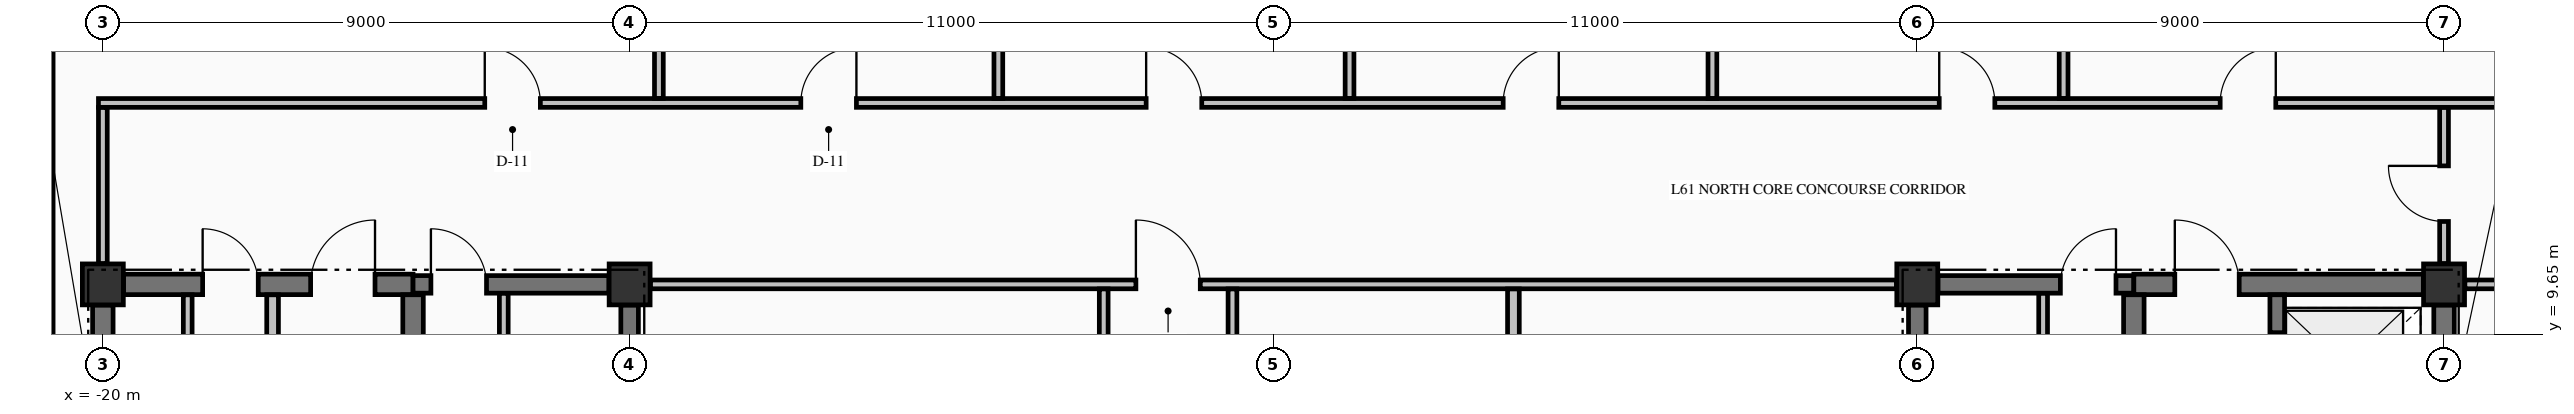
"""IFC4 building model, lengths in metres.
Left out: names, types, materials, properties, quantities, classifications, styles, units other than length and angle.
Written with IfcOpenShell. Run it as: python <this file> out.ifc"""

import sys

from ifc_helpers import new_model, si_unit, direction, frame, frame_2d, origin, origin_2d, place, context, subcontext, project, spatial, rectangle, extrude, element, fill, save


model = new_model("IFC4")
c1 = context("Model", 3, precision=1e-05, world=origin(), true_north=direction((0.0, 1.0)))
c2 = subcontext(c1, "Body", "Model", "MODEL_VIEW")
j1 = project(units=[si_unit("LENGTHUNIT", "METRE"), si_unit("PLANEANGLEUNIT", "RADIAN")], contexts=[c1])
p1 = place(None, origin())
s1 = spatial("IfcSite", under=j1, at=p1, CompositionType="ELEMENT")
p2 = place(p1, origin())
s2 = spatial("IfcBuilding", under=s1, at=p2, CompositionType="ELEMENT")
p3 = place(p2, frame((0.0, 0.0, 233.28)))
s3 = spatial("IfcBuildingStorey", under=s2, at=p3, CompositionType="ELEMENT", Elevation=233.28)
for number, where, z_axis, x_axis in (
    (1, (-20.0, 10.5, -0.25), (0.0, 0.0, 1.0), (1.0, 0.0, 0.0)),
    (2, (-11.0, 10.5, -0.25), (0.0, 0.0, 1.0), (1.0, 0.0, 0.0)),
    (3, (11.0, 10.5, -0.25), (0.0, 0.0, 1.0), (1.0, 0.0, 0.0)),
    (4, (20.0, 10.5, -0.25), (0.0, 0.0, 1.0), (1.0, 0.0, 0.0)),
):
    element("IfcColumn", number, at=place(p3, frame(where, z_axis=z_axis, x_axis=x_axis)), inside=s3, PredefinedType="COLUMN", context=c2, shape_type="SweptSolid", body=[
        extrude(rectangle(XDim=0.7, YDim=0.7, at=origin_2d()), origin(), (0.0, 0.0, 1.0), 3.23),
    ])
p4 = place(p3, frame((-21.0, 17.545, 0.0), z_axis=(0.0, 0.0, 1.0), x_axis=(0.0, -1.0, 0.0)))
e5 = element("IfcWall", 5, at=p4, inside=s3, PredefinedType="STANDARD", context=c2, shape_type="SweptSolid", body=[
    extrude(rectangle(XDim=8.09, YDim=0.3, at=frame_2d((4.045, 0.0))), origin(), (0.0, 0.0, 1.0), 2.372),
])
p5 = place(p3, frame((-19.646, 10.5, 0.0), z_axis=(0.0, 0.0, 1.0), x_axis=(1.0, 0.0, 0.0)))
e6 = element("IfcWall", 6, at=p5, inside=s3, PredefinedType="SHEAR", context=c2, shape_type="SweptSolid", body=[
    extrude(rectangle(XDim=4.946, YDim=0.35, at=frame_2d((2.473, 0.0))), origin(), (0.0, 0.0, 1.0), 2.98),
])
p6 = place(p5, frame((3.196, 0.0, 0.0)))
e7 = element("IfcOpeningElement", 7, at=p6, cuts=e6, PredefinedType="OPENING", context=c2, shape_type="SweptSolid", body=[
    extrude(rectangle(XDim=1.1, YDim=2.15, at=frame_2d((0.55, 1.075))), frame((0.0, 0.185, 0.0), z_axis=(0.0, -1.0, 0.0), x_axis=(1.0, 0.0, 0.0)), (0.0, 0.0, 1.0), 0.37),
])
p7 = place(p5, frame((1.351, 0.0, 0.0)))
e8 = element("IfcOpeningElement", 8, at=p7, cuts=e6, PredefinedType="OPENING", context=c2, shape_type="SweptSolid", body=[
    extrude(rectangle(XDim=0.95, YDim=2.15, at=frame_2d((0.475, 1.075))), frame((0.0, 0.185, 0.0), z_axis=(0.0, -1.0, 0.0), x_axis=(1.0, 0.0, 0.0)), (0.0, 0.0, 1.0), 0.37),
])
p8 = place(p3, frame((-14.7, 10.5, 0.0), z_axis=(0.0, 0.0, 1.0), x_axis=(1.0, 0.0, 0.0)))
e9 = element("IfcWall", 9, at=p8, inside=s3, PredefinedType="SHEAR", context=c2, shape_type="SweptSolid", body=[
    extrude(rectangle(XDim=3.346, YDim=0.3, at=frame_2d((1.673, 0.0))), origin(), (0.0, 0.0, 1.0), 2.98),
])
p9 = place(p8, frame((0.305, 0.0, 0.0)))
e10 = element("IfcOpeningElement", 10, at=p9, cuts=e9, PredefinedType="OPENING", context=c2, shape_type="SweptSolid", body=[
    extrude(rectangle(XDim=0.95, YDim=2.15, at=frame_2d((0.475, 1.075))), frame((0.0, 0.16, 0.0), z_axis=(0.0, -1.0, 0.0), x_axis=(1.0, 0.0, 0.0)), (0.0, 0.0, 1.0), 0.32),
])
p10 = place(p3, frame((11.354, 10.5, 0.0), z_axis=(0.0, 0.0, 1.0), x_axis=(1.0, 0.0, 0.0)))
e11 = element("IfcWall", 11, at=p10, inside=s3, PredefinedType="SHEAR", context=c2, shape_type="SweptSolid", body=[
    extrude(rectangle(XDim=3.346, YDim=0.3, at=frame_2d((1.673, 0.0))), origin(), (0.0, 0.0, 1.0), 2.98),
])
p11 = place(p10, frame((2.091, 0.0, 0.0)))
e12 = element("IfcOpeningElement", 12, at=p11, cuts=e11, PredefinedType="OPENING", context=c2, shape_type="SweptSolid", body=[
    extrude(rectangle(XDim=0.95, YDim=2.15, at=frame_2d((0.475, 1.075))), frame((0.0, 0.16, 0.0), z_axis=(0.0, -1.0, 0.0), x_axis=(1.0, 0.0, 0.0)), (0.0, 0.0, 1.0), 0.32),
])
p12 = place(p3, frame((14.7, 10.5, 0.0), z_axis=(0.0, 0.0, 1.0), x_axis=(1.0, 0.0, 0.0)))
e13 = element("IfcWall", 13, at=p12, inside=s3, PredefinedType="SHEAR", context=c2, shape_type="SweptSolid", body=[
    extrude(rectangle(XDim=4.946, YDim=0.35, at=frame_2d((2.473, 0.0))), origin(), (0.0, 0.0, 1.0), 2.98),
])
p13 = place(p12, frame((0.7, 0.0, 0.0)))
e14 = element("IfcOpeningElement", 14, at=p13, cuts=e13, PredefinedType="OPENING", context=c2, shape_type="SweptSolid", body=[
    extrude(rectangle(XDim=1.1, YDim=2.15, at=frame_2d((0.55, 1.075))), frame((0.0, 0.185, 0.0), z_axis=(0.0, -1.0, 0.0), x_axis=(1.0, 0.0, 0.0)), (0.0, 0.0, 1.0), 0.37),
])
p14 = place(p3, frame((-10.644, 10.5, 0.0), z_axis=(0.0, 0.0, 1.0), x_axis=(1.0, 0.0, 0.0)))
e15 = element("IfcWall", 15, at=p14, inside=s3, PredefinedType="PARTITIONING", context=c2, shape_type="SweptSolid", body=[
    extrude(rectangle(XDim=21.288, YDim=0.15, at=frame_2d((10.644, 0.0))), origin(), (0.0, 0.0, 1.0), 2.98),
])
p15 = place(p14, frame((8.294, 0.0, 0.0)))
e16 = element("IfcOpeningElement", 16, at=p15, cuts=e15, PredefinedType="OPENING", context=c2, shape_type="SweptSolid", body=[
    extrude(rectangle(XDim=1.1, YDim=2.15, at=frame_2d((0.55, 1.075))), frame((0.0, 0.085, 0.0), z_axis=(0.0, -1.0, 0.0), x_axis=(1.0, 0.0, 0.0)), (0.0, 0.0, 1.0), 0.17),
])
p16 = place(p3, frame((20.356, 10.5, 0.0), z_axis=(0.0, 0.0, 1.0), x_axis=(1.0, 0.0, 0.0)))
e17 = element("IfcWall", 17, at=p16, inside=s3, PredefinedType="PARTITIONING", context=c2, shape_type="SweptSolid", body=[
    extrude(rectangle(XDim=5.479, YDim=0.15, at=frame_2d((2.74, 0.0))), origin(), (0.0, 0.0, 1.0), 2.98),
])
p17 = place(p16, frame((2.169, 0.0, 0.0)))
e18 = element("IfcOpeningElement", 18, at=p17, cuts=e17, PredefinedType="OPENING", context=c2, shape_type="SweptSolid", body=[
    extrude(rectangle(XDim=0.95, YDim=2.15, at=frame_2d((0.475, 1.075))), frame((0.0, 0.085, 0.0), z_axis=(0.0, -1.0, 0.0), x_axis=(1.0, 0.0, 0.0)), (0.0, 0.0, 1.0), 0.17),
])
p18 = place(p3, frame((-20.075, 13.6, 0.0), z_axis=(0.0, 0.0, 1.0), x_axis=(1.0, 0.0, 0.0)))
e19 = element("IfcWall", 19, at=p18, inside=s3, PredefinedType="PARTITIONING", context=c2, shape_type="SweptSolid", body=[
    extrude(rectangle(XDim=45.91, YDim=0.15, at=frame_2d((22.955, 0.0))), origin(), (0.0, 0.0, 1.0), 2.98),
])
p19 = place(p18, frame((6.6, 0.0, 0.0)))
e20 = element("IfcOpeningElement", 20, at=p19, cuts=e19, PredefinedType="OPENING", context=c2, shape_type="SweptSolid", body=[
    extrude(rectangle(XDim=0.95, YDim=2.15, at=frame_2d((0.475, 1.075))), frame((0.0, 0.085, 0.0), z_axis=(0.0, -1.0, 0.0), x_axis=(1.0, 0.0, 0.0)), (0.0, 0.0, 1.0), 0.17),
])
p20 = place(p18, frame((12.0, 0.0, 0.0)))
e21 = element("IfcOpeningElement", 21, at=p20, cuts=e19, PredefinedType="OPENING", context=c2, shape_type="SweptSolid", body=[
    extrude(rectangle(XDim=0.95, YDim=2.15, at=frame_2d((0.475, 1.075))), frame((0.0, 0.085, 0.0), z_axis=(0.0, -1.0, 0.0), x_axis=(1.0, 0.0, 0.0)), (0.0, 0.0, 1.0), 0.17),
])
p21 = place(p18, frame((17.9, 0.0, 0.0)))
e22 = element("IfcOpeningElement", 22, at=p21, cuts=e19, PredefinedType="OPENING", context=c2, shape_type="SweptSolid", body=[
    extrude(rectangle(XDim=0.95, YDim=2.15, at=frame_2d((0.475, 1.075))), frame((0.0, 0.085, 0.0), z_axis=(0.0, -1.0, 0.0), x_axis=(1.0, 0.0, 0.0)), (0.0, 0.0, 1.0), 0.17),
])
p22 = place(p18, frame((24.0, 0.0, 0.0)))
e23 = element("IfcOpeningElement", 23, at=p22, cuts=e19, PredefinedType="OPENING", context=c2, shape_type="SweptSolid", body=[
    extrude(rectangle(XDim=0.95, YDim=2.15, at=frame_2d((0.475, 1.075))), frame((0.0, 0.085, 0.0), z_axis=(0.0, -1.0, 0.0), x_axis=(1.0, 0.0, 0.0)), (0.0, 0.0, 1.0), 0.17),
])
p23 = place(p18, frame((31.45, 0.0, 0.0)))
e24 = element("IfcOpeningElement", 24, at=p23, cuts=e19, PredefinedType="OPENING", context=c2, shape_type="SweptSolid", body=[
    extrude(rectangle(XDim=0.95, YDim=2.15, at=frame_2d((0.475, 1.075))), frame((0.0, 0.085, 0.0), z_axis=(0.0, -1.0, 0.0), x_axis=(1.0, 0.0, 0.0)), (0.0, 0.0, 1.0), 0.17),
])
p24 = place(p18, frame((36.25, 0.0, 0.0)))
e25 = element("IfcOpeningElement", 25, at=p24, cuts=e19, PredefinedType="OPENING", context=c2, shape_type="SweptSolid", body=[
    extrude(rectangle(XDim=0.95, YDim=2.15, at=frame_2d((0.475, 1.075))), frame((0.0, 0.085, 0.0), z_axis=(0.0, -1.0, 0.0), x_axis=(1.0, 0.0, 0.0)), (0.0, 0.0, 1.0), 0.17),
])
p25 = place(p3, frame((-20.0, 5.327, 0.0), z_axis=(0.0, 0.0, 1.0), x_axis=(0.0, 1.0, 0.0)))
e26 = element("IfcWall", 26, at=p25, inside=s3, PredefinedType="SHEAR", context=c2, shape_type="SweptSolid", body=[
    extrude(rectangle(XDim=4.819, YDim=0.35, at=frame_2d((2.41, 0.0))), origin(), (0.0, 0.0, 1.0), 2.98),
])
p26 = place(p3, frame((-14.7, 5.852, 0.0), z_axis=(0.0, 0.0, 1.0), x_axis=(0.0, 1.0, 0.0)))
e27 = element("IfcWall", 27, at=p26, inside=s3, PredefinedType="SHEAR", context=c2, shape_type="SweptSolid", body=[
    extrude(rectangle(XDim=4.471, YDim=0.35, at=frame_2d((2.235, 0.0))), origin(), (0.0, 0.0, 1.0), 2.98),
])
for number, where, z_axis, x_axis in (
    (28, (-11.0, 5.852, 0.0), (0.0, 0.0, 1.0), (0.0, 1.0, 0.0)),
    (29, (11.0, 5.852, 0.0), (0.0, 0.0, 1.0), (0.0, 1.0, 0.0)),
):
    element("IfcWall", number, at=place(p3, frame(where, z_axis=z_axis, x_axis=x_axis)), inside=s3, PredefinedType="SHEAR", context=c2, shape_type="SweptSolid", body=[
        extrude(rectangle(XDim=4.294, YDim=0.3, at=frame_2d((2.147, 0.0))), origin(), (0.0, 0.0, 1.0), 2.98),
    ])
p27 = place(p3, frame((14.7, 5.852, 0.0), z_axis=(0.0, 0.0, 1.0), x_axis=(0.0, 1.0, 0.0)))
e30 = element("IfcWall", 30, at=p27, inside=s3, PredefinedType="SHEAR", context=c2, shape_type="SweptSolid", body=[
    extrude(rectangle(XDim=4.471, YDim=0.35, at=frame_2d((2.235, 0.0))), origin(), (0.0, 0.0, 1.0), 2.98),
])
p28 = place(p3, frame((17.15, 7.877, 0.0), z_axis=(0.0, 0.0, 1.0), x_axis=(0.0, 1.0, 0.0)))
e31 = element("IfcWall", 31, at=p28, inside=s3, PredefinedType="SOLIDWALL", context=c2, shape_type="SweptSolid", body=[
    extrude(rectangle(XDim=2.446, YDim=0.25, at=frame_2d((1.223, 0.0))), origin(), (0.0, 0.0, 1.0), 2.98),
])
p29 = place(p28, frame((0.698, 0.0, 0.0)))
e32 = element("IfcOpeningElement", 32, at=p29, cuts=e31, PredefinedType="OPENING", context=c2, shape_type="SweptSolid", body=[
    extrude(rectangle(XDim=1.1, YDim=2.2, at=frame_2d((0.55, 1.1))), frame((0.0, 0.135, 0.0), z_axis=(0.0, -1.0, 0.0), x_axis=(1.0, 0.0, 0.0)), (0.0, 0.0, 1.0), 0.27),
])
p30 = place(p3, frame((20.0, 7.877, 0.0), z_axis=(0.0, 0.0, 1.0), x_axis=(0.0, 1.0, 0.0)))
e33 = element("IfcWall", 33, at=p30, inside=s3, PredefinedType="SHEAR", context=c2, shape_type="SweptSolid", body=[
    extrude(rectangle(XDim=2.269, YDim=0.35, at=frame_2d((1.135, 0.0))), origin(), (0.0, 0.0, 1.0), 2.98),
])
p31 = place(p3, frame((-20.0, 10.856, 0.0), z_axis=(0.0, 0.0, 1.0), x_axis=(0.0, 1.0, 0.0)))
e34 = element("IfcWall", 34, at=p31, inside=s3, PredefinedType="PARTITIONING", context=c2, shape_type="SweptSolid", body=[
    extrude(rectangle(XDim=2.666, YDim=0.15, at=frame_2d((1.333, 0.0))), origin(), (0.0, 0.0, 1.0), 2.57),
])
p32 = place(p3, frame((-18.55, 5.328, 0.0), z_axis=(0.0, 0.0, 1.0), x_axis=(0.0, 1.0, 0.0)))
e35 = element("IfcWall", 35, at=p32, inside=s3, PredefinedType="PARTITIONING", context=c2, shape_type="SweptSolid", body=[
    extrude(rectangle(XDim=4.994, YDim=0.15, at=frame_2d((2.497, 0.0))), origin(), (0.0, 0.0, 1.0), 2.98),
])
p33 = place(p32, frame((2.047, 0.0, 0.0)))
e36 = element("IfcOpeningElement", 36, at=p33, cuts=e35, PredefinedType="OPENING", context=c2, shape_type="SweptSolid", body=[
    extrude(rectangle(XDim=0.95, YDim=2.15, at=frame_2d((0.475, 1.075))), frame((0.0, 0.085, 0.0), z_axis=(0.0, -1.0, 0.0), x_axis=(1.0, 0.0, 0.0)), (0.0, 0.0, 1.0), 0.17),
])
p34 = place(p3, frame((-17.1, 5.328, 0.0), z_axis=(0.0, 0.0, 1.0), x_axis=(0.0, 1.0, 0.0)))
e37 = element("IfcWall", 37, at=p34, inside=s3, PredefinedType="PARTITIONING", context=c2, shape_type="SweptSolid", body=[
    extrude(rectangle(XDim=4.994, YDim=0.2, at=frame_2d((2.497, 0.0))), origin(), (0.0, 0.0, 1.0), 2.98),
])
p35 = place(p3, frame((-13.15, 7.228, 0.0), z_axis=(0.0, 0.0, 1.0), x_axis=(0.0, 1.0, 0.0)))
e38 = element("IfcWall", 38, at=p35, inside=s3, PredefinedType="PARTITIONING", context=c2, shape_type="SweptSolid", body=[
    extrude(rectangle(XDim=3.119, YDim=0.15, at=frame_2d((1.56, 0.0))), origin(), (0.0, 0.0, 1.0), 2.98),
])
p36 = place(p35, frame((1.097, 0.0, 0.0)))
e39 = element("IfcOpeningElement", 39, at=p36, cuts=e38, PredefinedType="OPENING", context=c2, shape_type="SweptSolid", body=[
    extrude(rectangle(XDim=0.95, YDim=2.15, at=frame_2d((0.475, 1.075))), frame((0.0, 0.085, 0.0), z_axis=(0.0, -1.0, 0.0), x_axis=(1.0, 0.0, 0.0)), (0.0, 0.0, 1.0), 0.17),
])
for number, where, z_axis, x_axis in (
    (40, (-10.5, 13.678, 0.0), (0.0, 0.0, 1.0), (0.0, 1.0, 0.0)),
    (41, (-4.7, 13.678, 0.0), (0.0, 0.0, 1.0), (0.0, 1.0, 0.0)),
):
    element("IfcWall", number, at=place(p3, frame(where, z_axis=z_axis, x_axis=x_axis)), inside=s3, PredefinedType="PARTITIONING", context=c2, shape_type="SweptSolid", body=[
        extrude(rectangle(XDim=9.657, YDim=0.15, at=frame_2d((4.829, 0.0))), origin(), (0.0, 0.0, 1.0), 2.98),
    ])
for number, where, z_axis, x_axis in (
    (42, (-2.9, 2.978, 0.0), (0.0, 0.0, 1.0), (0.0, 1.0, 0.0)),
    (43, (-0.7, 2.978, 0.0), (0.0, 0.0, 1.0), (0.0, 1.0, 0.0)),
):
    element("IfcWall", number, at=place(p3, frame(where, z_axis=z_axis, x_axis=x_axis)), inside=s3, PredefinedType="PARTITIONING", context=c2, shape_type="SweptSolid", body=[
        extrude(rectangle(XDim=7.444, YDim=0.15, at=frame_2d((3.722, 0.0))), origin(), (0.0, 0.0, 1.0), 2.98),
    ])
p37 = place(p3, frame((1.3, 13.678, 0.0), z_axis=(0.0, 0.0, 1.0), x_axis=(0.0, 1.0, 0.0)))
e44 = element("IfcWall", 44, at=p37, inside=s3, PredefinedType="PARTITIONING", context=c2, shape_type="SweptSolid", body=[
    extrude(rectangle(XDim=9.657, YDim=0.15, at=frame_2d((4.829, 0.0))), origin(), (0.0, 0.0, 1.0), 2.98),
])
p38 = place(p3, frame((4.1, 2.978, 0.0), z_axis=(0.0, 0.0, 1.0), x_axis=(0.0, 1.0, 0.0)))
e45 = element("IfcWall", 45, at=p38, inside=s3, PredefinedType="PARTITIONING", context=c2, shape_type="SweptSolid", body=[
    extrude(rectangle(XDim=7.444, YDim=0.2, at=frame_2d((3.722, 0.0))), origin(), (0.0, 0.0, 1.0), 2.98),
])
p39 = place(p3, frame((7.5, 13.678, 0.0), z_axis=(0.0, 0.0, 1.0), x_axis=(0.0, 1.0, 0.0)))
e46 = element("IfcWall", 46, at=p39, inside=s3, PredefinedType="PARTITIONING", context=c2, shape_type="SweptSolid", body=[
    extrude(rectangle(XDim=9.657, YDim=0.15, at=frame_2d((4.829, 0.0))), origin(), (0.0, 0.0, 1.0), 2.98),
])
p40 = place(p3, frame((13.15, 7.228, 0.0), z_axis=(0.0, 0.0, 1.0), x_axis=(0.0, 1.0, 0.0)))
e47 = element("IfcWall", 47, at=p40, inside=s3, PredefinedType="PARTITIONING", context=c2, shape_type="SweptSolid", body=[
    extrude(rectangle(XDim=3.119, YDim=0.15, at=frame_2d((1.56, 0.0))), origin(), (0.0, 0.0, 1.0), 2.98),
])
p41 = place(p40, frame((1.097, 0.0, 0.0)))
e48 = element("IfcOpeningElement", 48, at=p41, cuts=e47, PredefinedType="OPENING", context=c2, shape_type="SweptSolid", body=[
    extrude(rectangle(XDim=0.95, YDim=2.15, at=frame_2d((0.475, 1.075))), frame((0.0, 0.085, 0.0), z_axis=(0.0, -1.0, 0.0), x_axis=(1.0, 0.0, 0.0)), (0.0, 0.0, 1.0), 0.17),
])
p42 = place(p3, frame((13.5, 13.678, 0.0), z_axis=(0.0, 0.0, 1.0), x_axis=(0.0, 1.0, 0.0)))
e49 = element("IfcWall", 49, at=p42, inside=s3, PredefinedType="PARTITIONING", context=c2, shape_type="SweptSolid", body=[
    extrude(rectangle(XDim=9.657, YDim=0.15, at=frame_2d((4.829, 0.0))), origin(), (0.0, 0.0, 1.0), 2.98),
])
p43 = place(p3, frame((20.0, 10.856, 0.0), z_axis=(0.0, 0.0, 1.0), x_axis=(0.0, 1.0, 0.0)))
e50 = element("IfcWall", 50, at=p43, inside=s3, PredefinedType="PARTITIONING", context=c2, shape_type="SweptSolid", body=[
    extrude(rectangle(XDim=2.666, YDim=0.15, at=frame_2d((1.333, 0.0))), origin(), (0.0, 0.0, 1.0), 2.98),
])
p44 = place(p43, frame((0.719, 0.0, 0.0)))
e51 = element("IfcOpeningElement", 51, at=p44, cuts=e50, PredefinedType="OPENING", context=c2, shape_type="SweptSolid", body=[
    extrude(rectangle(XDim=0.95, YDim=2.15, at=frame_2d((0.475, 1.075))), frame((0.0, 0.085, 0.0), z_axis=(0.0, -1.0, 0.0), x_axis=(1.0, 0.0, 0.0)), (0.0, 0.0, 1.0), 0.17),
])
p45 = place(p9, origin())
e52 = element("IfcDoor", 52, at=p45, inside=s3, OperationType="SINGLE_SWING_LEFT", PredefinedType="DOOR", context=c2, shape_type="SweptSolid", body=[
    extrude(rectangle(XDim=0.95, YDim=2.15, at=frame_2d((0.475, 1.075))), frame((0.0, 0.025, 0.0), z_axis=(0.0, -1.0, 0.0), x_axis=(1.0, 0.0, 0.0)), (0.0, 0.0, 1.0), 0.05),
])
fill(e10, e52)
p46 = place(p11, origin())
e53 = element("IfcDoor", 53, at=p46, inside=s3, OperationType="SINGLE_SWING_RIGHT", PredefinedType="DOOR", context=c2, shape_type="SweptSolid", body=[
    extrude(rectangle(XDim=0.95, YDim=2.15, at=frame_2d((0.475, 1.075))), frame((0.0, 0.025, 0.0), z_axis=(0.0, -1.0, 0.0), x_axis=(1.0, 0.0, 0.0)), (0.0, 0.0, 1.0), 0.05),
])
fill(e12, e53)
p47 = place(p6, origin())
e54 = element("IfcDoor", 54, at=p47, inside=s3, OperationType="SINGLE_SWING_RIGHT", PredefinedType="DOOR", context=c2, shape_type="SweptSolid", body=[
    extrude(rectangle(XDim=1.1, YDim=2.15, at=frame_2d((0.55, 1.075))), frame((0.0, 0.025, 0.0), z_axis=(0.0, -1.0, 0.0), x_axis=(1.0, 0.0, 0.0)), (0.0, 0.0, 1.0), 0.05),
])
fill(e7, e54)
p48 = place(p7, origin())
e55 = element("IfcDoor", 55, at=p48, inside=s3, OperationType="SINGLE_SWING_LEFT", PredefinedType="DOOR", context=c2, shape_type="SweptSolid", body=[
    extrude(rectangle(XDim=0.95, YDim=2.15, at=frame_2d((0.475, 1.075))), frame((0.0, 0.025, 0.0), z_axis=(0.0, -1.0, 0.0), x_axis=(1.0, 0.0, 0.0)), (0.0, 0.0, 1.0), 0.05),
])
fill(e8, e55)
p49 = place(p29, origin())
e56 = element("IfcDoor", 56, at=p49, inside=s3, OperationType="SLIDING_TO_RIGHT", PredefinedType="DOOR", context=c2, shape_type="SweptSolid", body=[
    extrude(rectangle(XDim=1.1, YDim=2.2, at=frame_2d((0.55, 1.1))), frame((0.0, 0.025, 0.0), z_axis=(0.0, -1.0, 0.0), x_axis=(1.0, 0.0, 0.0)), (0.0, 0.0, 1.0), 0.05),
])
fill(e32, e56)
p50 = place(p13, origin())
e57 = element("IfcDoor", 57, at=p50, inside=s3, OperationType="SINGLE_SWING_LEFT", PredefinedType="DOOR", context=c2, shape_type="SweptSolid", body=[
    extrude(rectangle(XDim=1.1, YDim=2.15, at=frame_2d((0.55, 1.075))), frame((0.0, 0.025, 0.0), z_axis=(0.0, -1.0, 0.0), x_axis=(1.0, 0.0, 0.0)), (0.0, 0.0, 1.0), 0.05),
])
fill(e14, e57)
p51 = place(p15, origin())
e58 = element("IfcDoor", 58, at=p51, inside=s3, OperationType="SINGLE_SWING_LEFT", PredefinedType="DOOR", context=c2, shape_type="SweptSolid", body=[
    extrude(rectangle(XDim=1.1, YDim=2.15, at=frame_2d((0.55, 1.075))), frame((0.0, 0.025, 0.0), z_axis=(0.0, -1.0, 0.0), x_axis=(1.0, 0.0, 0.0)), (0.0, 0.0, 1.0), 0.05),
])
fill(e16, e58)
p52 = place(p19, origin())
e59 = element("IfcDoor", 59, at=p52, inside=s3, OperationType="SINGLE_SWING_LEFT", PredefinedType="DOOR", context=c2, shape_type="SweptSolid", body=[
    extrude(rectangle(XDim=0.95, YDim=2.15, at=frame_2d((0.475, 1.075))), frame((0.0, 0.025, 0.0), z_axis=(0.0, -1.0, 0.0), x_axis=(1.0, 0.0, 0.0)), (0.0, 0.0, 1.0), 0.05),
])
fill(e20, e59)
p53 = place(p20, origin())
e60 = element("IfcDoor", 60, at=p53, inside=s3, OperationType="SINGLE_SWING_RIGHT", PredefinedType="DOOR", context=c2, shape_type="SweptSolid", body=[
    extrude(rectangle(XDim=0.95, YDim=2.15, at=frame_2d((0.475, 1.075))), frame((0.0, 0.025, 0.0), z_axis=(0.0, -1.0, 0.0), x_axis=(1.0, 0.0, 0.0)), (0.0, 0.0, 1.0), 0.05),
])
fill(e21, e60)
p54 = place(p21, origin())
e61 = element("IfcDoor", 61, at=p54, inside=s3, OperationType="SINGLE_SWING_LEFT", PredefinedType="DOOR", context=c2, shape_type="SweptSolid", body=[
    extrude(rectangle(XDim=0.95, YDim=2.15, at=frame_2d((0.475, 1.075))), frame((0.0, 0.025, 0.0), z_axis=(0.0, -1.0, 0.0), x_axis=(1.0, 0.0, 0.0)), (0.0, 0.0, 1.0), 0.05),
])
fill(e22, e61)
p55 = place(p22, origin())
e62 = element("IfcDoor", 62, at=p55, inside=s3, OperationType="SINGLE_SWING_RIGHT", PredefinedType="DOOR", context=c2, shape_type="SweptSolid", body=[
    extrude(rectangle(XDim=0.95, YDim=2.15, at=frame_2d((0.475, 1.075))), frame((0.0, 0.025, 0.0), z_axis=(0.0, -1.0, 0.0), x_axis=(1.0, 0.0, 0.0)), (0.0, 0.0, 1.0), 0.05),
])
fill(e23, e62)
p56 = place(p23, origin())
e63 = element("IfcDoor", 63, at=p56, inside=s3, OperationType="SINGLE_SWING_LEFT", PredefinedType="DOOR", context=c2, shape_type="SweptSolid", body=[
    extrude(rectangle(XDim=0.95, YDim=2.15, at=frame_2d((0.475, 1.075))), frame((0.0, 0.025, 0.0), z_axis=(0.0, -1.0, 0.0), x_axis=(1.0, 0.0, 0.0)), (0.0, 0.0, 1.0), 0.05),
])
fill(e24, e63)
p57 = place(p24, origin())
e64 = element("IfcDoor", 64, at=p57, inside=s3, OperationType="SINGLE_SWING_RIGHT", PredefinedType="DOOR", context=c2, shape_type="SweptSolid", body=[
    extrude(rectangle(XDim=0.95, YDim=2.15, at=frame_2d((0.475, 1.075))), frame((0.0, 0.025, 0.0), z_axis=(0.0, -1.0, 0.0), x_axis=(1.0, 0.0, 0.0)), (0.0, 0.0, 1.0), 0.05),
])
fill(e25, e64)
p58 = place(p44, origin())
e65 = element("IfcDoor", 65, at=p58, inside=s3, OperationType="SINGLE_SWING_RIGHT", PredefinedType="DOOR", context=c2, shape_type="SweptSolid", body=[
    extrude(rectangle(XDim=0.95, YDim=2.15, at=frame_2d((0.475, 1.075))), frame((0.0, 0.025, 0.0), z_axis=(0.0, -1.0, 0.0), x_axis=(1.0, 0.0, 0.0)), (0.0, 0.0, 1.0), 0.05),
])
fill(e51, e65)
save(model, sys.argv[1])
